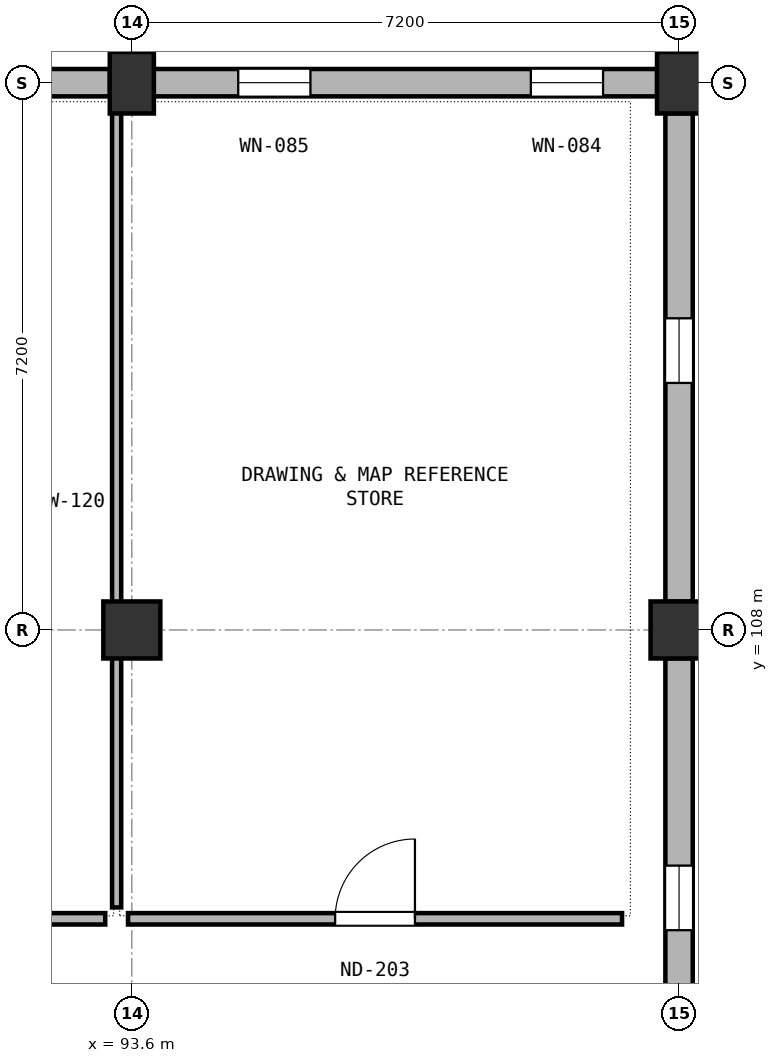
"""IFC4 building model, lengths in metres.
Left out: names, types, materials, properties, quantities, classifications, styles, units other than length and angle.
Written with IfcOpenShell. Run it as: python <this file> out.ifc"""

import sys

from ifc_helpers import new_model, si_unit, direction, frame, frame_2d, origin, origin_2d, place, context, subcontext, project, spatial, rectangle, extrude, element, fill, save


model = new_model("IFC4")
c1 = context("Model", 3, precision=1e-05, world=origin(), true_north=direction((0.0, 1.0)))
c2 = subcontext(c1, "Body", "Model", "MODEL_VIEW")
j1 = project(units=[si_unit("LENGTHUNIT", "METRE"), si_unit("PLANEANGLEUNIT", "RADIAN")], contexts=[c1])
p1 = place(None, origin())
s1 = spatial("IfcSite", under=j1, at=p1, CompositionType="ELEMENT")
p2 = place(p1, origin())
s2 = spatial("IfcBuilding", under=s1, at=p2, CompositionType="ELEMENT")
p3 = place(p2, frame((0.0, 0.0, 14.4)))
s3 = spatial("IfcBuildingStorey", under=s2, at=p3, CompositionType="ELEMENT", Elevation=14.4)
p4 = place(p3, frame((93.6, 108.0, 0.0), z_axis=(0.0, 0.0, 1.0), x_axis=(1.0, 0.0, 0.0)))
e1 = element("IfcColumn", 1, at=p4, inside=s3, PredefinedType="COLUMN", context=c2, shape_type="SweptSolid", body=[
    extrude(rectangle(XDim=0.75, YDim=0.75, at=origin_2d()), origin(), (0.0, 0.0, 1.0), 4.2),
])
p5 = place(p3, frame((93.6, 115.2, 0.0), z_axis=(0.0, 0.0, 1.0), x_axis=(1.0, 0.0, 0.0)))
e2 = element("IfcColumn", 2, at=p5, inside=s3, PredefinedType="COLUMN", context=c2, shape_type="SweptSolid", body=[
    extrude(rectangle(XDim=0.58, YDim=0.81, at=origin_2d()), origin(), (0.0, 0.0, 1.0), 4.2),
])
p6 = place(p3, frame((100.8, 108.0, 0.0), z_axis=(0.0, 0.0, 1.0), x_axis=(1.0, 0.0, 0.0)))
e3 = element("IfcColumn", 3, at=p6, inside=s3, PredefinedType="COLUMN", context=c2, shape_type="SweptSolid", body=[
    extrude(rectangle(XDim=0.75, YDim=0.75, at=origin_2d()), origin(), (0.0, 0.0, 1.0), 4.2),
])
p7 = place(p3, frame((100.8, 115.2, 0.0), z_axis=(0.0, 0.0, 1.0), x_axis=(1.0, 0.0, 0.0)))
e4 = element("IfcColumn", 4, at=p7, inside=s3, PredefinedType="COLUMN", context=c2, shape_type="SweptSolid", body=[
    extrude(rectangle(XDim=0.58, YDim=0.81, at=origin_2d()), origin(), (0.0, 0.0, 1.0), 4.2),
])
p8 = place(p3, frame((93.312, 115.2, 0.0), z_axis=(0.0, 0.0, 1.0), x_axis=(-1.0, 0.0, 0.0)))
e5 = element("IfcWall", 5, at=p8, inside=s3, PredefinedType="SOLIDWALL", context=c2, shape_type="SweptSolid", body=[
    extrude(rectangle(XDim=6.624, YDim=0.36, at=frame_2d((3.312, 0.0))), origin(), (0.0, 0.0, 1.0), 3.04),
])
p9 = place(p8, frame((0.862, 0.0, 0.7)))
e6 = element("IfcOpeningElement", 6, at=p9, cuts=e5, PredefinedType="OPENING", context=c2, shape_type="SweptSolid", body=[
    extrude(rectangle(XDim=0.95, YDim=2.14, at=frame_2d((0.475, 1.07))), frame((0.0, 0.19, 0.0), z_axis=(0.0, -1.0, 0.0), x_axis=(1.0, 0.0, 0.0)), (0.0, 0.0, 1.0), 0.38),
])
p10 = place(p8, frame((4.712, 0.0, 0.7)))
e7 = element("IfcOpeningElement", 7, at=p10, cuts=e5, PredefinedType="OPENING", context=c2, shape_type="SweptSolid", body=[
    extrude(rectangle(XDim=0.95, YDim=2.14, at=frame_2d((0.475, 1.07))), frame((0.0, 0.19, 0.0), z_axis=(0.0, -1.0, 0.0), x_axis=(1.0, 0.0, 0.0)), (0.0, 0.0, 1.0), 0.38),
])
p11 = place(p3, frame((100.512, 115.2, 0.0), z_axis=(0.0, 0.0, 1.0), x_axis=(-1.0, 0.0, 0.0)))
e8 = element("IfcWall", 8, at=p11, inside=s3, PredefinedType="SOLIDWALL", context=c2, shape_type="SweptSolid", body=[
    extrude(rectangle(XDim=6.624, YDim=0.36, at=frame_2d((3.312, 0.0))), origin(), (0.0, 0.0, 1.0), 3.04),
])
p12 = place(p11, frame((0.712, 0.0, 0.7)))
e9 = element("IfcOpeningElement", 9, at=p12, cuts=e8, PredefinedType="OPENING", context=c2, shape_type="SweptSolid", body=[
    extrude(rectangle(XDim=0.95, YDim=2.14, at=frame_2d((0.475, 1.07))), frame((0.0, 0.19, 0.0), z_axis=(0.0, -1.0, 0.0), x_axis=(1.0, 0.0, 0.0)), (0.0, 0.0, 1.0), 0.38),
])
p13 = place(p11, frame((4.562, 0.0, 0.7)))
e10 = element("IfcOpeningElement", 10, at=p13, cuts=e8, PredefinedType="OPENING", context=c2, shape_type="SweptSolid", body=[
    extrude(rectangle(XDim=0.95, YDim=2.14, at=frame_2d((0.475, 1.07))), frame((0.0, 0.19, 0.0), z_axis=(0.0, -1.0, 0.0), x_axis=(1.0, 0.0, 0.0)), (0.0, 0.0, 1.0), 0.38),
])
p14 = place(p3, frame((100.8, 107.627, 0.0), z_axis=(0.0, 0.0, 1.0), x_axis=(0.0, -1.0, 0.0)))
e11 = element("IfcWall", 11, at=p14, inside=s3, PredefinedType="SOLIDWALL", context=c2, shape_type="SweptSolid", body=[
    extrude(rectangle(XDim=6.454, YDim=0.36, at=frame_2d((3.227, 0.0))), origin(), (0.0, 0.0, 1.0), 3.04),
])
p15 = place(p14, frame((2.727, 0.0, 0.7)))
e12 = element("IfcOpeningElement", 12, at=p15, cuts=e11, PredefinedType="OPENING", context=c2, shape_type="SweptSolid", body=[
    extrude(rectangle(XDim=0.85, YDim=2.19, at=frame_2d((0.425, 1.095))), frame((0.0, 0.19, 0.0), z_axis=(0.0, -1.0, 0.0), x_axis=(1.0, 0.0, 0.0)), (0.0, 0.0, 1.0), 0.38),
])
p16 = place(p3, frame((100.8, 114.797, 0.0), z_axis=(0.0, 0.0, 1.0), x_axis=(0.0, -1.0, 0.0)))
e13 = element("IfcWall", 13, at=p16, inside=s3, PredefinedType="SOLIDWALL", context=c2, shape_type="SweptSolid", body=[
    extrude(rectangle(XDim=6.424, YDim=0.36, at=frame_2d((3.212, 0.0))), origin(), (0.0, 0.0, 1.0), 3.04),
])
p17 = place(p16, frame((2.697, 0.0, 0.7)))
e14 = element("IfcOpeningElement", 14, at=p17, cuts=e13, PredefinedType="OPENING", context=c2, shape_type="SweptSolid", body=[
    extrude(rectangle(XDim=0.85, YDim=2.19, at=frame_2d((0.425, 1.095))), frame((0.0, 0.19, 0.0), z_axis=(0.0, -1.0, 0.0), x_axis=(1.0, 0.0, 0.0)), (0.0, 0.0, 1.0), 0.38),
])
p18 = place(p3, frame((81.15, 104.2, 0.0), z_axis=(0.0, 0.0, 1.0), x_axis=(1.0, 0.0, 0.0)))
e15 = element("IfcWall", 15, at=p18, inside=s3, PredefinedType="PARTITIONING", context=c2, shape_type="SweptSolid", body=[
    extrude(rectangle(XDim=12.1, YDim=0.15, at=frame_2d((6.05, 0.0))), origin(), (0.0, 0.0, 1.0), 3.08),
])
p19 = place(p18, frame((1.85, 0.0, 0.0)))
e16 = element("IfcOpeningElement", 16, at=p19, cuts=e15, PredefinedType="OPENING", context=c2, shape_type="SweptSolid", body=[
    extrude(rectangle(XDim=1.0, YDim=2.15, at=frame_2d((0.5, 1.075))), frame((0.0, 0.085, 0.0), z_axis=(0.0, -1.0, 0.0), x_axis=(1.0, 0.0, 0.0)), (0.0, 0.0, 1.0), 0.17),
])
p20 = place(p3, frame((93.55, 104.2, 0.0), z_axis=(0.0, 0.0, 1.0), x_axis=(1.0, 0.0, 0.0)))
e17 = element("IfcWall", 17, at=p20, inside=s3, PredefinedType="PARTITIONING", context=c2, shape_type="SweptSolid", body=[
    extrude(rectangle(XDim=6.5, YDim=0.15, at=frame_2d((3.25, 0.0))), origin(), (0.0, 0.0, 1.0), 3.08),
])
p21 = place(p20, frame((2.725, 0.0, 0.0)))
e18 = element("IfcOpeningElement", 18, at=p21, cuts=e17, PredefinedType="OPENING", context=c2, shape_type="SweptSolid", body=[
    extrude(rectangle(XDim=1.05, YDim=2.15, at=frame_2d((0.525, 1.075))), frame((0.0, 0.085, 0.0), z_axis=(0.0, -1.0, 0.0), x_axis=(1.0, 0.0, 0.0)), (0.0, 0.0, 1.0), 0.17),
])
p22 = place(p3, frame((93.4, 104.35, 0.0), z_axis=(0.0, 0.0, 1.0), x_axis=(0.0, 1.0, 0.0)))
e19 = element("IfcWall", 19, at=p22, inside=s3, PredefinedType="PARTITIONING", context=c2, shape_type="SweptSolid", body=[
    extrude(rectangle(XDim=10.67, YDim=0.12, at=frame_2d((5.335, 0.0))), origin(), (0.0, 0.0, 1.0), 3.08),
])
p23 = place(p12, origin())
e20 = element("IfcWindow", 20, at=p23, inside=s3, PartitioningType="SINGLE_PANEL", PredefinedType="WINDOW", context=c2, shape_type="SweptSolid", body=[
    extrude(rectangle(XDim=0.95, YDim=2.14, at=frame_2d((0.475, 1.07))), frame((0.0, 0.03, 0.0), z_axis=(0.0, -1.0, 0.0), x_axis=(1.0, 0.0, 0.0)), (0.0, 0.0, 1.0), 0.06),
])
fill(e9, e20)
p24 = place(p13, origin())
e21 = element("IfcWindow", 21, at=p24, inside=s3, PartitioningType="SINGLE_PANEL", PredefinedType="WINDOW", context=c2, shape_type="SweptSolid", body=[
    extrude(rectangle(XDim=0.95, YDim=2.14, at=frame_2d((0.475, 1.07))), frame((0.0, 0.03, 0.0), z_axis=(0.0, -1.0, 0.0), x_axis=(1.0, 0.0, 0.0)), (0.0, 0.0, 1.0), 0.06),
])
fill(e10, e21)
p25 = place(p15, origin())
e22 = element("IfcWindow", 22, at=p25, inside=s3, PartitioningType="SINGLE_PANEL", PredefinedType="WINDOW", context=c2, shape_type="SweptSolid", body=[
    extrude(rectangle(XDim=0.85, YDim=2.19, at=frame_2d((0.425, 1.095))), frame((0.0, 0.03, 0.0), z_axis=(0.0, -1.0, 0.0), x_axis=(1.0, 0.0, 0.0)), (0.0, 0.0, 1.0), 0.06),
])
fill(e12, e22)
p26 = place(p17, origin())
e23 = element("IfcWindow", 23, at=p26, inside=s3, PartitioningType="SINGLE_PANEL", PredefinedType="WINDOW", context=c2, shape_type="SweptSolid", body=[
    extrude(rectangle(XDim=0.85, YDim=2.19, at=frame_2d((0.425, 1.095))), frame((0.0, 0.03, 0.0), z_axis=(0.0, -1.0, 0.0), x_axis=(1.0, 0.0, 0.0)), (0.0, 0.0, 1.0), 0.06),
])
fill(e14, e23)
p27 = place(p21, origin())
e24 = element("IfcDoor", 24, at=p27, inside=s3, OperationType="SINGLE_SWING_RIGHT", PredefinedType="DOOR", context=c2, shape_type="SweptSolid", body=[
    extrude(rectangle(XDim=1.05, YDim=2.15, at=frame_2d((0.525, 1.075))), frame((0.0, 0.025, 0.0), z_axis=(0.0, -1.0, 0.0), x_axis=(1.0, 0.0, 0.0)), (0.0, 0.0, 1.0), 0.05),
])
fill(e18, e24)
save(model, sys.argv[1])
